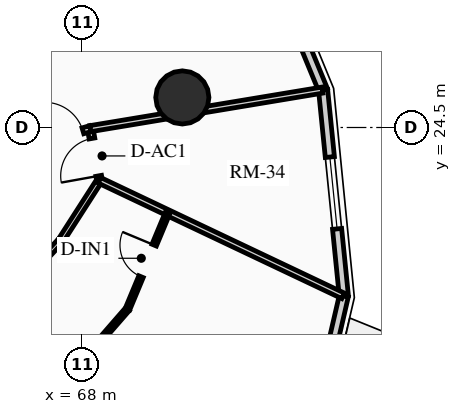
"""IFC4 building model, lengths in metres.
Left out: names, types, materials, properties, quantities, classifications, styles, units other than length and angle.
Written with IfcOpenShell. Run it as: python <this file> out.ifc"""

import sys

from ifc_helpers import new_model, si_unit, direction, frame, frame_2d, origin, origin_2d, place, context, subcontext, project, spatial, rectangle, circle, extrude, source, transform, mapped, element, fill, save


model = new_model("IFC4")
c1 = context("Model", 3, precision=1e-05, world=origin(), true_north=direction((0.0, 1.0)))
c2 = subcontext(c1, "Body", "Model", "MODEL_VIEW")
j1 = project(units=[si_unit("LENGTHUNIT", "METRE"), si_unit("PLANEANGLEUNIT", "RADIAN")], contexts=[c1])
p1 = place(None, origin())
s1 = spatial("IfcSite", under=j1, at=p1, CompositionType="ELEMENT")
p2 = place(p1, origin())
s2 = spatial("IfcBuilding", under=s1, at=p2, CompositionType="ELEMENT")
p3 = place(p2, frame((0.0, 0.0, 105.07)))
s3 = spatial("IfcBuildingStorey", under=s2, at=p3, CompositionType="ELEMENT", Elevation=105.07)
p4 = place(p3, frame((70.635, 25.291, 0.0), z_axis=(0.0, 0.0, 1.0), x_axis=(1.0, 0.0, 0.0)))
e1 = element("IfcColumn", 1, at=p4, inside=s3, PredefinedType="USERDEFINED", context=c2, shape_type="SweptSolid", body=[
    extrude(circle(Radius=0.7, at=origin_2d()), origin(), (0.0, 0.0, 1.0), 2.91),
])
p5 = place(p3, frame((74.885, 20.067, 0.0), z_axis=(0.0, 0.0, 1.0), x_axis=(-0.225834725257, -0.974165631126, 0.0)))
e2 = element("IfcWall", 2, at=p5, inside=s3, PredefinedType="SOLIDWALL", context=c2, shape_type="SweptSolid", body=[
    extrude(rectangle(XDim=5.119, YDim=0.24, at=frame_2d((2.56, 0.0))), origin(), (0.0, 0.0, 1.0), 2.179),
])
p6 = place(p3, frame((74.339, 25.487, 0.0), z_axis=(0.0, 0.0, 1.0), x_axis=(0.10015591906, -0.994971754311, 0.0)))
e3 = element("IfcWall", 3, at=p6, inside=s3, PredefinedType="SOLIDWALL", context=c2, shape_type="SweptSolid", body=[
    extrude(rectangle(XDim=5.448, YDim=0.24, at=frame_2d((2.724, 0.0))), origin(), (0.0, 0.0, 1.0), 2.179),
])
m1 = source(origin(), c2, "Body", "SweptSolid", [
    extrude(rectangle(XDim=1.9, YDim=1.35, at=frame_2d((0.95, 0.675))), frame((0.0, 0.13, 0.0), z_axis=(0.0, -1.0, 0.0), x_axis=(1.0, 0.0, 0.0)), (0.0, 0.0, 1.0), 0.26),
])
p7 = place(p6, frame((1.774, 0.0, 0.65)))
e4 = element("IfcOpeningElement", 4, at=p7, cuts=e3, PredefinedType="OPENING", context=c2, shape_type="MappedRepresentation", body=[
    mapped(m1, transform((0.0, 0.0, 0.0), x_axis=(1.0, 0.0, 0.0), y_axis=(0.0, 1.0, 0.0), z_axis=(0.0, 0.0, 1.0), scale=1.0)),
])
p8 = place(p3, frame((72.145, 30.811, 0.0), z_axis=(0.0, 0.0, 1.0), x_axis=(0.381027003055, -0.924563909604, 0.0)))
e5 = element("IfcWall", 5, at=p8, inside=s3, PredefinedType="SOLIDWALL", context=c2, shape_type="SweptSolid", body=[
    extrude(rectangle(XDim=5.758, YDim=0.24, at=frame_2d((2.879, 0.0))), origin(), (0.0, 0.0, 1.0), 2.179),
])
p9 = place(p3, frame((62.903, 16.667, 0.0), z_axis=(0.0, 0.0, 1.0), x_axis=(0.682371947497, 0.731005147225, 0.0)))
e6 = element("IfcWall", 6, at=p9, inside=s3, PredefinedType="PARTITIONING", context=c2, shape_type="SweptSolid", body=[
    extrude(rectangle(XDim=6.642, YDim=0.15, at=frame_2d((3.321, 0.0))), origin(), (0.0, 0.0, 1.0), 2.225),
])
m2 = source(origin(), c2, "Body", "SweptSolid", [
    extrude(rectangle(XDim=1.05, YDim=2.015, at=frame_2d((0.525, 1.007))), frame((0.0, 0.085, 0.0), z_axis=(0.0, -1.0, 0.0), x_axis=(1.0, 0.0, 0.0)), (0.0, 0.0, 1.0), 0.17),
])
p10 = place(p9, frame((2.796, 0.0, 0.0)))
e7 = element("IfcOpeningElement", 7, at=p10, cuts=e6, PredefinedType="OPENING", context=c2, shape_type="MappedRepresentation", body=[
    mapped(m2, transform((0.0, 0.0, 0.0), x_axis=(1.0, 0.0, 0.0), y_axis=(0.0, 1.0, 0.0), z_axis=(0.0, 0.0, 1.0), scale=1.0)),
])
p11 = place(p3, frame((67.435, 21.521, 0.0), z_axis=(0.0, 0.0, 1.0), x_axis=(0.540777197838, 0.841165870859, 0.0)))
e8 = element("IfcWall", 8, at=p11, inside=s3, PredefinedType="PARTITIONING", context=c2, shape_type="SweptSolid", body=[
    extrude(rectangle(XDim=1.888, YDim=0.15, at=frame_2d((0.944, 0.0))), origin(), (0.0, 0.0, 1.0), 2.225),
])
p12 = place(p3, frame((68.456, 23.11, 0.0), z_axis=(0.0, 0.0, 1.0), x_axis=(-0.1772522795, 0.984165448191, 0.0)))
e9 = element("IfcWall", 9, at=p12, inside=s3, PredefinedType="PARTITIONING", context=c2, shape_type="SweptSolid", body=[
    extrude(rectangle(XDim=1.382, YDim=0.15, at=frame_2d((0.691, 0.0))), origin(), (0.0, 0.0, 1.0), 2.225),
])
m3 = source(origin(), c2, "Body", "SweptSolid", [
    extrude(rectangle(XDim=1.0, YDim=2.015, at=frame_2d((0.5, 1.007))), frame((0.0, 0.085, 0.0), z_axis=(0.0, -1.0, 0.0), x_axis=(1.0, 0.0, 0.0)), (0.0, 0.0, 1.0), 0.17),
])
p13 = place(p12, frame((0.12, 0.0, 0.0)))
e10 = element("IfcOpeningElement", 10, at=p13, cuts=e9, PredefinedType="OPENING", context=c2, shape_type="MappedRepresentation", body=[
    mapped(m3, transform((0.0, 0.0, 0.0), x_axis=(1.0, 0.0, 0.0), y_axis=(0.0, 1.0, 0.0), z_axis=(0.0, 0.0, 1.0), scale=1.0)),
])
p14 = place(p3, frame((68.456, 23.11, 0.0), z_axis=(0.0, 0.0, 1.0), x_axis=(0.903539425667, -0.428504966442, 0.0)))
e11 = element("IfcWall", 11, at=p14, inside=s3, PredefinedType="PARTITIONING", context=c2, shape_type="SweptSolid", body=[
    extrude(rectangle(XDim=7.094, YDim=0.16, at=frame_2d((3.547, 0.0))), origin(), (0.0, 0.0, 1.0), 2.179),
])
p15 = place(p3, frame((68.211, 24.469, 0.0), z_axis=(0.0, 0.0, 1.0), x_axis=(0.986479033329, 0.163887512651, 0.0)))
e12 = element("IfcWall", 12, at=p15, inside=s3, PredefinedType="PARTITIONING", context=c2, shape_type="SweptSolid", body=[
    extrude(rectangle(XDim=6.193, YDim=0.16, at=frame_2d((3.096, 0.0))), origin(), (0.0, 0.0, 1.0), 2.179),
])
p16 = place(p3, frame((66.056, 23.828, 0.0), z_axis=(0.0, 0.0, 1.0), x_axis=(0.958475403544, 0.285175210708, 0.0)))
e13 = element("IfcWall", 13, at=p16, inside=s3, PredefinedType="PARTITIONING", context=c2, shape_type="SweptSolid", body=[
    extrude(rectangle(XDim=2.248, YDim=0.16, at=frame_2d((1.124, 0.0))), origin(), (0.0, 0.0, 1.0), 2.225),
])
m4 = source(origin(), c2, "Body", "SweptSolid", [
    extrude(rectangle(XDim=1.05, YDim=2.015, at=frame_2d((0.525, 1.007))), frame((0.0, 0.09, 0.0), z_axis=(0.0, -1.0, 0.0), x_axis=(1.0, 0.0, 0.0)), (0.0, 0.0, 1.0), 0.18),
])
p17 = place(p16, frame((0.998, 0.0, 0.0)))
e14 = element("IfcOpeningElement", 14, at=p17, cuts=e13, PredefinedType="OPENING", context=c2, shape_type="MappedRepresentation", body=[
    mapped(m4, transform((0.0, 0.0, 0.0), x_axis=(1.0, 0.0, 0.0), y_axis=(0.0, 1.0, 0.0), z_axis=(0.0, 0.0, 1.0), scale=1.0)),
])
p18 = place(p3, frame((65.162, 15.088, 0.0), z_axis=(0.0, 0.0, 1.0), x_axis=(0.656379509785, 0.754430871011, 0.0)))
e15 = element("IfcWall", 15, at=p18, inside=s3, PredefinedType="PARTITIONING", context=c2, shape_type="SweptSolid", body=[
    extrude(rectangle(XDim=6.14, YDim=0.125, at=frame_2d((3.07, 0.0))), origin(), (0.0, 0.0, 1.0), 2.225),
])
p19 = place(p3, frame((69.192, 19.72, 0.0), z_axis=(0.0, 0.0, 1.0), x_axis=(0.384899070029, 0.922958669655, 0.0)))
e16 = element("IfcWall", 16, at=p19, inside=s3, PredefinedType="PARTITIONING", context=c2, shape_type="SweptSolid", body=[
    extrude(rectangle(XDim=2.75, YDim=0.125, at=frame_2d((1.375, 0.0))), origin(), (0.0, 0.0, 1.0), 2.179),
])
m5 = source(origin(), c2, "Body", "SweptSolid", [
    extrude(rectangle(XDim=0.9, YDim=2.005, at=frame_2d((0.45, 1.002))), frame((0.0, 0.073, 0.0), z_axis=(0.0, -1.0, 0.0), x_axis=(1.0, 0.0, 0.0)), (0.0, 0.0, 1.0), 0.145),
])
p20 = place(p19, frame((0.925, 0.0, 0.0)))
e17 = element("IfcOpeningElement", 17, at=p20, cuts=e16, PredefinedType="OPENING", context=c2, shape_type="MappedRepresentation", body=[
    mapped(m5, transform((0.0, 0.0, 0.0), x_axis=(1.0, 0.0, 0.0), y_axis=(0.0, 1.0, 0.0), z_axis=(0.0, 0.0, 1.0), scale=1.0)),
])
m6 = source(origin(), c2, "Body", "SweptSolid", [
    extrude(rectangle(XDim=1.9, YDim=1.35, at=frame_2d((0.95, 0.675))), frame((0.0, 0.03, 0.0), z_axis=(0.0, -1.0, 0.0), x_axis=(1.0, 0.0, 0.0)), (0.0, 0.0, 1.0), 0.06),
])
p21 = place(p7, origin())
e18 = element("IfcWindow", 18, at=p21, inside=s3, PartitioningType="DOUBLE_PANEL_VERTICAL", PredefinedType="WINDOW", context=c2, shape_type="MappedRepresentation", body=[
    mapped(m6, transform((0.0, 0.0, 0.0), x_axis=(1.0, 0.0, 0.0), y_axis=(0.0, 1.0, 0.0), z_axis=(0.0, 0.0, 1.0), scale=1.0)),
])
fill(e4, e18)
m7 = source(origin(), c2, "Body", "SweptSolid", [
    extrude(rectangle(XDim=1.05, YDim=2.015, at=frame_2d((0.525, 1.007))), frame((0.0, 0.025, 0.0), z_axis=(0.0, -1.0, 0.0), x_axis=(1.0, 0.0, 0.0)), (0.0, 0.0, 1.0), 0.05),
])
p22 = place(p17, origin())
e19 = element("IfcDoor", 19, at=p22, inside=s3, OperationType="SINGLE_SWING_LEFT", PredefinedType="DOOR", context=c2, shape_type="MappedRepresentation", body=[
    mapped(m7, transform((0.0, 0.0, 0.0), x_axis=(1.0, 0.0, 0.0), y_axis=(0.0, 1.0, 0.0), z_axis=(0.0, 0.0, 1.0), scale=1.0)),
])
fill(e14, e19)
m8 = source(origin(), c2, "Body", "SweptSolid", [
    extrude(rectangle(XDim=0.9, YDim=2.005, at=frame_2d((0.45, 1.002))), frame((0.0, 0.025, 0.0), z_axis=(0.0, -1.0, 0.0), x_axis=(1.0, 0.0, 0.0)), (0.0, 0.0, 1.0), 0.05),
])
p23 = place(p20, origin())
e20 = element("IfcDoor", 20, at=p23, inside=s3, OperationType="SINGLE_SWING_RIGHT", PredefinedType="DOOR", context=c2, shape_type="MappedRepresentation", body=[
    mapped(m8, transform((0.0, 0.0, 0.0), x_axis=(1.0, 0.0, 0.0), y_axis=(0.0, 1.0, 0.0), z_axis=(0.0, 0.0, 1.0), scale=1.0)),
])
fill(e17, e20)
m9 = source(origin(), c2, "Body", "SweptSolid", [
    extrude(rectangle(XDim=1.0, YDim=2.015, at=frame_2d((0.5, 1.007))), frame((0.0, 0.025, 0.0), z_axis=(0.0, -1.0, 0.0), x_axis=(1.0, 0.0, 0.0)), (0.0, 0.0, 1.0), 0.05),
])
p24 = place(p13, origin())
e21 = element("IfcDoor", 21, at=p24, inside=s3, OperationType="SINGLE_SWING_LEFT", PredefinedType="DOOR", context=c2, shape_type="MappedRepresentation", body=[
    mapped(m9, transform((0.0, 0.0, 0.0), x_axis=(1.0, 0.0, 0.0), y_axis=(0.0, 1.0, 0.0), z_axis=(0.0, 0.0, 1.0), scale=1.0)),
])
fill(e10, e21)
save(model, sys.argv[1])
